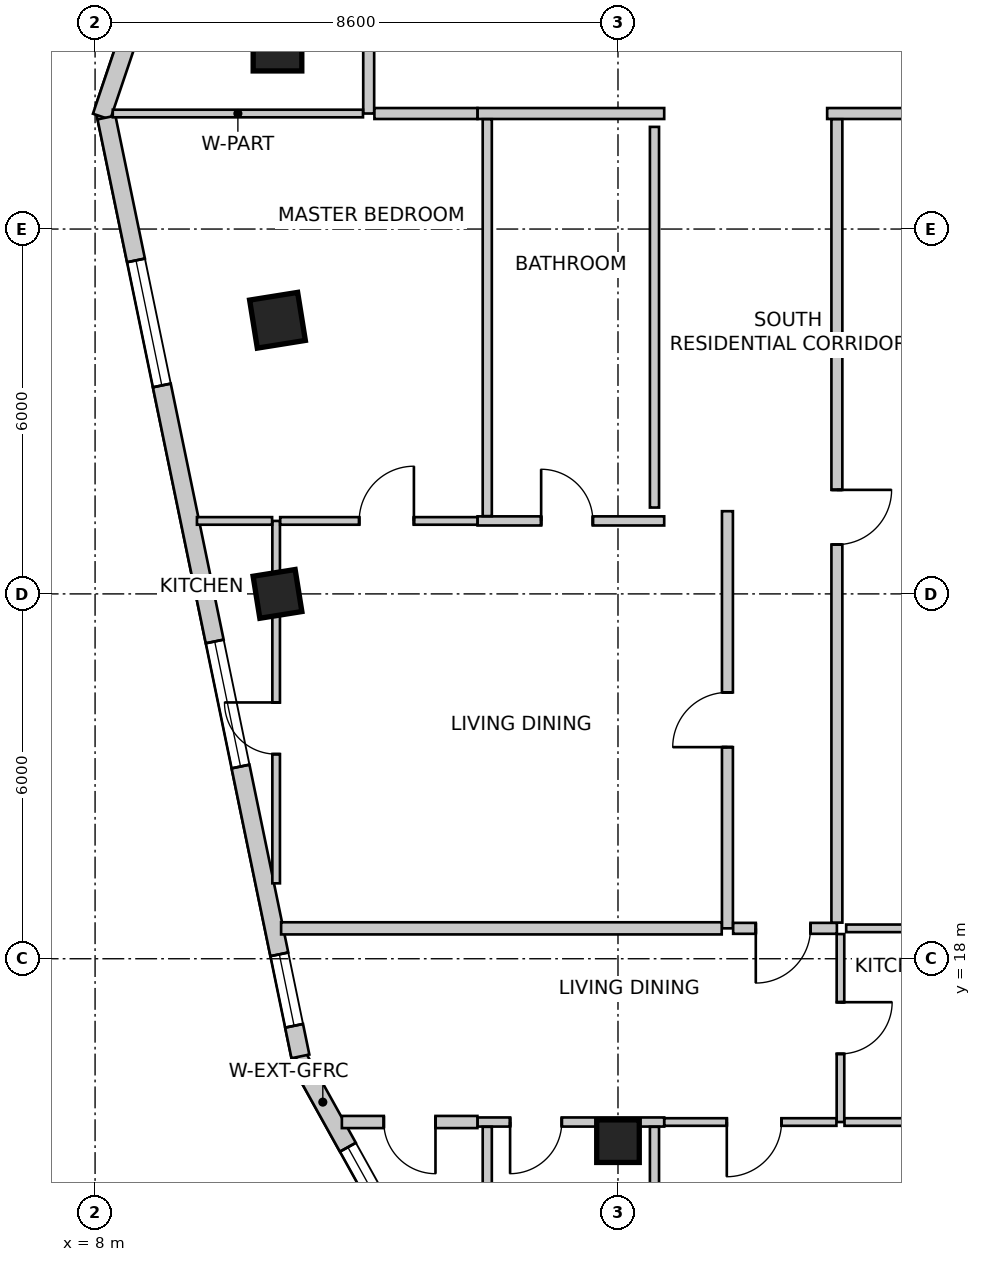
"""IFC4 building model, lengths in metres.
Left out: names, types, materials, properties, quantities, classifications, styles, units other than length and angle.
Written with IfcOpenShell. Run it as: python <this file> out.ifc"""

import sys

from ifc_helpers import new_model, si_unit, direction, frame, frame_2d, origin, origin_2d, place, context, subcontext, project, spatial, rectangle, extrude, source, transform, mapped, element, fill, save


model = new_model("IFC4")
c1 = context("Model", 3, precision=1e-05, world=origin(), true_north=direction((0.0, 1.0)))
c2 = subcontext(c1, "Body", "Model", "MODEL_VIEW")
j1 = project(units=[si_unit("LENGTHUNIT", "METRE"), si_unit("PLANEANGLEUNIT", "RADIAN")], contexts=[c1])
p1 = place(None, origin())
s1 = spatial("IfcSite", under=j1, at=p1, CompositionType="ELEMENT")
p2 = place(p1, origin())
s2 = spatial("IfcBuilding", under=s1, at=p2, CompositionType="ELEMENT")
p3 = place(p2, frame((0.0, 0.0, 200.9)))
s3 = spatial("IfcBuildingStorey", under=s2, at=p3, CompositionType="ELEMENT", Elevation=200.9)
m1 = source(origin(), c2, "Body", "SweptSolid", [
    extrude(rectangle(XDim=0.8, YDim=0.8, at=origin_2d()), origin(), (0.0, 0.0, 1.0), 3.5),
])
for number, where, z_axis, x_axis in (
    (1, (11.0, 33.0, 0.0), (0.0, 0.0, 1.0), (1.0, 0.0, 0.0)),
    (2, (11.0, 28.5, 0.0), (0.0, 0.0, 1.0), (0.158, -0.987, 0.0)),
):
    element("IfcColumn", number, at=place(p3, frame(where, z_axis=z_axis, x_axis=x_axis)), inside=s3, PredefinedType="COLUMN", context=c2, shape_type="MappedRepresentation", body=[
        mapped(m1, transform((0.0, 0.0, 0.0), scale=1.0)),
    ])
m2 = source(origin(), c2, "Body", "SweptSolid", [
    extrude(rectangle(XDim=0.7, YDim=0.7, at=origin_2d()), origin(), (0.0, 0.0, 1.0), 3.5),
])
for number, where, z_axis, x_axis in (
    (3, (11.0, 24.0, 0.0), (0.0, 0.0, 1.0), (0.158, -0.987, 0.0)),
    (4, (16.6, 15.0, 0.0), (0.0, 0.0, 1.0), (1.0, 0.0, 0.0)),
):
    element("IfcColumn", number, at=place(p3, frame(where, z_axis=z_axis, x_axis=x_axis)), inside=s3, PredefinedType="COLUMN", context=c2, shape_type="MappedRepresentation", body=[
        mapped(m2, transform((0.0, 0.0, 0.0), scale=1.0)),
    ])
p4 = place(p3, frame((11.333, 16.384, 0.0), z_axis=(0.0, 0.0, 1.0), x_axis=(0.485633305139, -0.874162623852, 0.0)))
e5 = element("IfcWall", 5, at=p4, inside=s3, PredefinedType="SOLIDWALL", context=c2, shape_type="SweptSolid", body=[
    extrude(rectangle(XDim=4.307, YDim=0.3, at=frame_2d((2.153, 0.0))), origin(), (0.0, 0.0, 1.0), 3.25),
])
m3 = source(origin(), c2, "Body", "SweptSolid", [
    extrude(rectangle(XDim=2.1, YDim=2.0, at=frame_2d((1.05, 1.0))), frame((0.0, 0.16, 0.0), z_axis=(0.0, -1.0, 0.0), x_axis=(1.0, 0.0, 0.0)), (0.0, 0.0, 1.0), 0.32),
])
p5 = place(p4, frame((1.697, 0.0, 0.85)))
e6 = element("IfcOpeningElement", 6, at=p5, cuts=e5, PredefinedType="OPENING", context=c2, shape_type="MappedRepresentation", body=[
    mapped(m3, transform((0.0, 0.0, 0.0), scale=1.0)),
])
p6 = place(p3, frame((13.269, 47.134, 0.0), z_axis=(0.0, 0.0, 1.0), x_axis=(-0.319920776449, -0.947444297464, 0.0)))
e7 = element("IfcWall", 7, at=p6, inside=s3, PredefinedType="SOLIDWALL", context=c2, shape_type="SweptSolid", body=[
    extrude(rectangle(XDim=16.133, YDim=0.3, at=frame_2d((8.067, 0.0))), origin(), (0.0, 0.0, 1.0), 3.25),
])
m4 = source(origin(), c2, "Body", "SweptSolid", [
    extrude(rectangle(XDim=2.4, YDim=2.2, at=frame_2d((1.2, 1.1))), frame((0.0, 0.16, 0.0), z_axis=(0.0, -1.0, 0.0), x_axis=(1.0, 0.0, 0.0)), (0.0, 0.0, 1.0), 0.32),
])
p7 = place(p6, frame((2.363, 0.0, 0.85)))
e8 = element("IfcOpeningElement", 8, at=p7, cuts=e7, PredefinedType="OPENING", context=c2, shape_type="MappedRepresentation", body=[
    mapped(m4, transform((0.0, 0.0, 0.0), scale=1.0)),
])
p8 = place(p6, frame((7.41, 0.0, 0.85)))
e9 = element("IfcOpeningElement", 9, at=p8, cuts=e7, PredefinedType="OPENING", context=c2, shape_type="MappedRepresentation", body=[
    mapped(m3, transform((0.0, 0.0, 0.0), scale=1.0)),
])
p9 = place(p6, frame((12.157, 0.0, 0.85)))
e10 = element("IfcOpeningElement", 10, at=p9, cuts=e7, PredefinedType="OPENING", context=c2, shape_type="MappedRepresentation", body=[
    mapped(m4, transform((0.0, 0.0, 0.0), scale=1.0)),
])
p10 = place(p3, frame((8.188, 31.834, 0.0), z_axis=(0.0, 0.0, 1.0), x_axis=(0.202303475707, -0.979322880217, 0.0)))
e11 = element("IfcWall", 11, at=p10, inside=s3, PredefinedType="SOLIDWALL", context=c2, shape_type="SweptSolid", body=[
    extrude(rectangle(XDim=15.766, YDim=0.3, at=frame_2d((7.883, 0.0))), origin(), (0.0, 0.0, 1.0), 3.25),
])
p11 = place(p10, frame((2.399, 0.0, 0.85)))
e12 = element("IfcOpeningElement", 12, at=p11, cuts=e11, PredefinedType="OPENING", context=c2, shape_type="MappedRepresentation", body=[
    mapped(m3, transform((0.0, 0.0, 0.0), scale=1.0)),
])
p12 = place(p10, frame((8.798, 0.0, 0.85)))
e13 = element("IfcOpeningElement", 13, at=p12, cuts=e11, PredefinedType="OPENING", context=c2, shape_type="MappedRepresentation", body=[
    mapped(m3, transform((0.0, 0.0, 0.0), scale=1.0)),
])
m5 = source(origin(), c2, "Body", "SweptSolid", [
    extrude(rectangle(XDim=1.2, YDim=1.6, at=frame_2d((0.6, 0.8))), frame((0.0, 0.16, 0.0), z_axis=(0.0, -1.0, 0.0), x_axis=(1.0, 0.0, 0.0)), (0.0, 0.0, 1.0), 0.32),
])
p13 = place(p10, frame((14.052, 0.0, 0.85)))
e14 = element("IfcOpeningElement", 14, at=p13, cuts=e11, PredefinedType="OPENING", context=c2, shape_type="MappedRepresentation", body=[
    mapped(m5, transform((0.0, 0.0, 0.0), scale=1.0)),
])
p14 = place(p3, frame((12.5, 31.9, 0.0), z_axis=(0.0, 0.0, 1.0), x_axis=(0.0, 1.0, 0.0)))
e15 = element("IfcWall", 15, at=p14, inside=s3, PredefinedType="PARTITIONING", context=c2, shape_type="SweptSolid", body=[
    extrude(rectangle(XDim=1.556, YDim=0.18, at=frame_2d((0.778, 0.0))), origin(), (0.0, 0.0, 1.0), 2.934),
])
p15 = place(p3, frame((17.36, 31.9, 0.0), z_axis=(0.0, 0.0, 1.0), x_axis=(-1.0, 0.0, 0.0)))
e16 = element("IfcWall", 16, at=p15, inside=s3, PredefinedType="PARTITIONING", context=c2, shape_type="SweptSolid", body=[
    extrude(rectangle(XDim=3.07, YDim=0.18, at=frame_2d((1.535, 0.0))), origin(), (0.0, 0.0, 1.0), 2.934),
])
p16 = place(p3, frame((14.288, 31.9, 0.0), z_axis=(0.0, 0.0, 1.0), x_axis=(-1.0, 0.0, 0.0)))
e17 = element("IfcWall", 17, at=p16, inside=s3, PredefinedType="PARTITIONING", context=c2, shape_type="SweptSolid", body=[
    extrude(rectangle(XDim=1.694, YDim=0.18, at=frame_2d((0.847, 0.0))), origin(), (0.0, 0.0, 1.0), 2.934),
])
p17 = place(p3, frame((29.265, 31.9, 0.0), z_axis=(0.0, 0.0, 1.0), x_axis=(-1.0, 0.0, 0.0)))
e18 = element("IfcWall", 18, at=p17, inside=s3, PredefinedType="PARTITIONING", context=c2, shape_type="SweptSolid", body=[
    extrude(rectangle(XDim=9.225, YDim=0.18, at=frame_2d((4.613, 0.0))), origin(), (0.0, 0.0, 1.0), 2.934),
])
p18 = place(p3, frame((12.406, 31.9, 0.0), z_axis=(0.0, 0.0, 1.0), x_axis=(-1.0, 0.0, 0.0)))
e19 = element("IfcWall", 19, at=p18, inside=s3, PredefinedType="PARTITIONING", context=c2, shape_type="SweptSolid", body=[
    extrude(rectangle(XDim=4.115, YDim=0.125, at=frame_2d((2.057, 0.0))), origin(), (0.0, 0.0, 1.0), 2.542),
])
p19 = place(p3, frame((18.4, 18.5, 0.0), z_axis=(0.0, 0.0, 1.0), x_axis=(0.0, 1.0, 0.0)))
e20 = element("IfcWall", 20, at=p19, inside=s3, PredefinedType="PARTITIONING", context=c2, shape_type="SweptSolid", body=[
    extrude(rectangle(XDim=6.86, YDim=0.18, at=frame_2d((3.43, 0.0))), origin(), (0.0, 0.0, 1.0), 2.766),
])
m6 = source(origin(), c2, "Body", "SweptSolid", [
    extrude(rectangle(XDim=0.9, YDim=2.15, at=frame_2d((0.45, 1.075))), frame((0.0, 0.1, 0.0), z_axis=(0.0, -1.0, 0.0), x_axis=(1.0, 0.0, 0.0)), (0.0, 0.0, 1.0), 0.2),
])
p20 = place(p19, frame((2.98, 0.0, 0.0)))
e21 = element("IfcOpeningElement", 21, at=p20, cuts=e20, PredefinedType="OPENING", context=c2, shape_type="MappedRepresentation", body=[
    mapped(m6, transform((0.0, 0.0, 0.0), scale=1.0)),
])
p21 = place(p3, frame((20.2, 18.5, 0.0), z_axis=(0.0, 0.0, 1.0), x_axis=(-1.0, 0.0, 0.0)))
e22 = element("IfcWall", 22, at=p21, inside=s3, PredefinedType="PARTITIONING", context=c2, shape_type="SweptSolid", body=[
    extrude(rectangle(XDim=1.706, YDim=0.18, at=frame_2d((0.853, 0.0))), origin(), (0.0, 0.0, 1.0), 3.25),
])
p22 = place(p21, frame((0.434, 0.0, 0.0)))
e23 = element("IfcOpeningElement", 23, at=p22, cuts=e22, PredefinedType="OPENING", context=c2, shape_type="MappedRepresentation", body=[
    mapped(m6, transform((0.0, 0.0, 0.0), scale=1.0)),
])
p23 = place(p3, frame((20.2, 31.806, 0.0), z_axis=(0.0, 0.0, 1.0), x_axis=(0.0, -1.0, 0.0)))
e24 = element("IfcWall", 24, at=p23, inside=s3, PredefinedType="PARTITIONING", context=c2, shape_type="SweptSolid", body=[
    extrude(rectangle(XDim=13.212, YDim=0.18, at=frame_2d((6.606, 0.0))), origin(), (0.0, 0.0, 1.0), 2.766),
])
p24 = place(p23, frame((6.095, 0.0, 0.0)))
e25 = element("IfcOpeningElement", 25, at=p24, cuts=e24, PredefinedType="OPENING", context=c2, shape_type="MappedRepresentation", body=[
    mapped(m6, transform((0.0, 0.0, 0.0), scale=1.0)),
])
p25 = place(p3, frame((10.978, 19.24, 0.0), z_axis=(0.0, 0.0, 1.0), x_axis=(0.0, 1.0, 0.0)))
e26 = element("IfcWall", 26, at=p25, inside=s3, PredefinedType="PARTITIONING", context=c2, shape_type="SweptSolid", body=[
    extrude(rectangle(XDim=5.96, YDim=0.125, at=frame_2d((2.98, 0.0))), origin(), (0.0, 0.0, 1.0), 2.542),
])
m7 = source(origin(), c2, "Body", "SweptSolid", [
    extrude(rectangle(XDim=0.85, YDim=2.15, at=frame_2d((0.425, 1.075))), frame((0.0, 0.073, 0.0), z_axis=(0.0, -1.0, 0.0), x_axis=(1.0, 0.0, 0.0)), (0.0, 0.0, 1.0), 0.145),
])
p26 = place(p25, frame((2.125, 0.0, 0.0)))
e27 = element("IfcOpeningElement", 27, at=p26, cuts=e26, PredefinedType="OPENING", context=c2, shape_type="MappedRepresentation", body=[
    mapped(m7, transform((0.0, 0.0, 0.0), scale=1.0)),
])
p27 = place(p3, frame((14.29, 25.2, 0.0), z_axis=(0.0, 0.0, 1.0), x_axis=(1.0, 0.0, 0.0)))
e28 = element("IfcWall", 28, at=p27, inside=s3, PredefinedType="PARTITIONING", context=c2, shape_type="SweptSolid", body=[
    extrude(rectangle(XDim=3.07, YDim=0.15, at=frame_2d((1.535, 0.0))), origin(), (0.0, 0.0, 1.0), 2.822),
])
m8 = source(origin(), c2, "Body", "SweptSolid", [
    extrude(rectangle(XDim=0.85, YDim=2.15, at=frame_2d((0.425, 1.075))), frame((0.0, 0.085, 0.0), z_axis=(0.0, -1.0, 0.0), x_axis=(1.0, 0.0, 0.0)), (0.0, 0.0, 1.0), 0.17),
])
p28 = place(p27, frame((1.046, 0.0, 0.0)))
e29 = element("IfcOpeningElement", 29, at=p28, cuts=e28, PredefinedType="OPENING", context=c2, shape_type="MappedRepresentation", body=[
    mapped(m8, transform((0.0, 0.0, 0.0), scale=1.0)),
])
p29 = place(p3, frame((11.044, 25.2, 0.0), z_axis=(0.0, 0.0, 1.0), x_axis=(1.0, 0.0, 0.0)))
e30 = element("IfcWall", 30, at=p29, inside=s3, PredefinedType="PARTITIONING", context=c2, shape_type="SweptSolid", body=[
    extrude(rectangle(XDim=3.244, YDim=0.125, at=frame_2d((1.622, 0.0))), origin(), (0.0, 0.0, 1.0), 2.542),
])
m9 = source(origin(), c2, "Body", "SweptSolid", [
    extrude(rectangle(XDim=0.9, YDim=2.15, at=frame_2d((0.45, 1.075))), frame((0.0, 0.073, 0.0), z_axis=(0.0, -1.0, 0.0), x_axis=(1.0, 0.0, 0.0)), (0.0, 0.0, 1.0), 0.145),
])
p30 = place(p29, frame((1.299, 0.0, 0.0)))
e31 = element("IfcOpeningElement", 31, at=p30, cuts=e30, PredefinedType="OPENING", context=c2, shape_type="MappedRepresentation", body=[
    mapped(m9, transform((0.0, 0.0, 0.0), scale=1.0)),
])
p31 = place(p3, frame((18.306, 18.5, 0.0), z_axis=(0.0, 0.0, 1.0), x_axis=(-1.0, 0.0, 0.0)))
e32 = element("IfcWall", 32, at=p31, inside=s3, PredefinedType="PARTITIONING", context=c2, shape_type="SweptSolid", body=[
    extrude(rectangle(XDim=7.246, YDim=0.2, at=frame_2d((3.623, 0.0))), origin(), (0.0, 0.0, 1.0), 3.25),
])
p32 = place(p3, frame((9.675, 25.2, 0.0), z_axis=(0.0, 0.0, 1.0), x_axis=(1.0, 0.0, 0.0)))
e33 = element("IfcWall", 33, at=p32, inside=s3, PredefinedType="PARTITIONING", context=c2, shape_type="SweptSolid", body=[
    extrude(rectangle(XDim=1.236, YDim=0.125, at=frame_2d((0.618, 0.0))), origin(), (0.0, 0.0, 1.0), 2.542),
])
p33 = place(p3, frame((14.45, 25.279, 0.0), z_axis=(0.0, 0.0, 1.0), x_axis=(0.0, 1.0, 0.0)))
e34 = element("IfcWall", 34, at=p33, inside=s3, PredefinedType="PARTITIONING", context=c2, shape_type="SweptSolid", body=[
    extrude(rectangle(XDim=6.527, YDim=0.15, at=frame_2d((3.263, 0.0))), origin(), (0.0, 0.0, 1.0), 2.766),
])
p34 = place(p3, frame((20.259, 18.406, 0.0), z_axis=(0.0, 0.0, 1.0), x_axis=(0.0, -1.0, 0.0)))
e35 = element("IfcWall", 35, at=p34, inside=s3, PredefinedType="PARTITIONING", context=c2, shape_type="SweptSolid", body=[
    extrude(rectangle(XDim=3.091, YDim=0.125, at=frame_2d((1.545, 0.0))), origin(), (0.0, 0.0, 1.0), 2.822),
])
p35 = place(p34, frame((1.121, 0.0, 0.0)))
e36 = element("IfcOpeningElement", 36, at=p35, cuts=e35, PredefinedType="OPENING", context=c2, shape_type="MappedRepresentation", body=[
    mapped(m7, transform((0.0, 0.0, 0.0), scale=1.0)),
])
p36 = place(p3, frame((17.36, 15.315, 0.0), z_axis=(0.0, 0.0, 1.0), x_axis=(-1.0, 0.0, 0.0)))
e37 = element("IfcWall", 37, at=p36, inside=s3, PredefinedType="PARTITIONING", context=c2, shape_type="SweptSolid", body=[
    extrude(rectangle(XDim=3.07, YDim=0.15, at=frame_2d((1.535, 0.0))), origin(), (0.0, 0.0, 1.0), 2.822),
])
p37 = place(p36, frame((1.685, 0.0, 0.0)))
e38 = element("IfcOpeningElement", 38, at=p37, cuts=e37, PredefinedType="OPENING", context=c2, shape_type="MappedRepresentation", body=[
    mapped(m8, transform((0.0, 0.0, 0.0), scale=1.0)),
])
p38 = place(p3, frame((14.288, 15.315, 0.0), z_axis=(0.0, 0.0, 1.0), x_axis=(-1.0, 0.0, 0.0)))
e39 = element("IfcWall", 39, at=p38, inside=s3, PredefinedType="PARTITIONING", context=c2, shape_type="SweptSolid", body=[
    extrude(rectangle(XDim=2.229, YDim=0.2, at=frame_2d((1.115, 0.0))), origin(), (0.0, 0.0, 1.0), 3.25),
])
m10 = source(origin(), c2, "Body", "SweptSolid", [
    extrude(rectangle(XDim=0.85, YDim=2.15, at=frame_2d((0.425, 1.075))), frame((0.0, 0.11, 0.0), z_axis=(0.0, -1.0, 0.0), x_axis=(1.0, 0.0, 0.0)), (0.0, 0.0, 1.0), 0.22),
])
p39 = place(p38, frame((0.69, 0.0, 0.0)))
e40 = element("IfcOpeningElement", 40, at=p39, cuts=e39, PredefinedType="OPENING", context=c2, shape_type="MappedRepresentation", body=[
    mapped(m10, transform((0.0, 0.0, 0.0), scale=1.0)),
])
p40 = place(p3, frame((20.192, 15.315, 0.0), z_axis=(0.0, 0.0, 1.0), x_axis=(-1.0, 0.0, 0.0)))
e41 = element("IfcWall", 41, at=p40, inside=s3, PredefinedType="PARTITIONING", context=c2, shape_type="SweptSolid", body=[
    extrude(rectangle(XDim=2.83, YDim=0.125, at=frame_2d((1.415, 0.0))), origin(), (0.0, 0.0, 1.0), 3.25),
])
p41 = place(p40, frame((0.903, 0.0, 0.0)))
e42 = element("IfcOpeningElement", 42, at=p41, cuts=e41, PredefinedType="OPENING", context=c2, shape_type="MappedRepresentation", body=[
    mapped(m9, transform((0.0, 0.0, 0.0), scale=1.0)),
])
p42 = place(p3, frame((23.792, 15.315, 0.0), z_axis=(0.0, 0.0, 1.0), x_axis=(-1.0, 0.0, 0.0)))
e43 = element("IfcWall", 43, at=p42, inside=s3, PredefinedType="PARTITIONING", context=c2, shape_type="SweptSolid", body=[
    extrude(rectangle(XDim=3.467, YDim=0.125, at=frame_2d((1.733, 0.0))), origin(), (0.0, 0.0, 1.0), 2.542),
])
p43 = place(p3, frame((20.353, 18.5, 0.0), z_axis=(0.0, 0.0, 1.0), x_axis=(1.0, 0.0, 0.0)))
e44 = element("IfcWall", 44, at=p43, inside=s3, PredefinedType="PARTITIONING", context=c2, shape_type="SweptSolid", body=[
    extrude(rectangle(XDim=3.439, YDim=0.125, at=frame_2d((1.72, 0.0))), origin(), (0.0, 0.0, 1.0), 2.542),
])
p44 = place(p3, frame((14.45, 12.865, 0.0), z_axis=(0.0, 0.0, 1.0), x_axis=(0.0, 1.0, 0.0)))
e45 = element("IfcWall", 45, at=p44, inside=s3, PredefinedType="PARTITIONING", context=c2, shape_type="SweptSolid", body=[
    extrude(rectangle(XDim=2.371, YDim=0.15, at=frame_2d((1.186, 0.0))), origin(), (0.0, 0.0, 1.0), 3.25),
])
p45 = place(p3, frame((17.2, 15.236, 0.0), z_axis=(0.0, 0.0, 1.0), x_axis=(0.0, -1.0, 0.0)))
e46 = element("IfcWall", 46, at=p45, inside=s3, PredefinedType="PARTITIONING", context=c2, shape_type="SweptSolid", body=[
    extrude(rectangle(XDim=2.371, YDim=0.15, at=frame_2d((1.186, 0.0))), origin(), (0.0, 0.0, 1.0), 2.542),
])
p46 = place(p3, frame((17.2, 31.68, 0.0), z_axis=(0.0, 0.0, 1.0), x_axis=(0.0, -1.0, 0.0)))
e47 = element("IfcWall", 47, at=p46, inside=s3, PredefinedType="PARTITIONING", context=c2, shape_type="SweptSolid", body=[
    extrude(rectangle(XDim=6.26, YDim=0.15, at=frame_2d((3.13, 0.0))), origin(), (0.0, 0.0, 1.0), 2.766),
])
m11 = source(origin(), c2, "Body", "SweptSolid", [
    extrude(rectangle(XDim=2.1, YDim=2.0, at=frame_2d((1.05, 1.0))), frame((0.0, -0.015, 0.0), z_axis=(0.0, -1.0, 0.0), x_axis=(1.0, 0.0, 0.0)), (0.0, 0.0, 1.0), 0.06),
])
p47 = place(p5, origin())
e48 = element("IfcWindow", 48, at=p47, inside=s3, PartitioningType="SINGLE_PANEL", PredefinedType="WINDOW", context=c2, shape_type="MappedRepresentation", body=[
    mapped(m11, transform((0.0, 0.0, 0.0), scale=1.0)),
])
fill(e6, e48)
p48 = place(p11, origin())
e49 = element("IfcWindow", 49, at=p48, inside=s3, PartitioningType="SINGLE_PANEL", PredefinedType="WINDOW", context=c2, shape_type="MappedRepresentation", body=[
    mapped(m11, transform((0.0, 0.0, 0.0), scale=1.0)),
])
fill(e12, e49)
p49 = place(p12, origin())
e50 = element("IfcWindow", 50, at=p49, inside=s3, PartitioningType="SINGLE_PANEL", PredefinedType="WINDOW", context=c2, shape_type="MappedRepresentation", body=[
    mapped(m11, transform((0.0, 0.0, 0.0), scale=1.0)),
])
fill(e13, e50)
m12 = source(origin(), c2, "Body", "SweptSolid", [
    extrude(rectangle(XDim=1.2, YDim=1.6, at=frame_2d((0.6, 0.8))), frame((0.0, -0.015, 0.0), z_axis=(0.0, -1.0, 0.0), x_axis=(1.0, 0.0, 0.0)), (0.0, 0.0, 1.0), 0.06),
])
p50 = place(p13, origin())
e51 = element("IfcWindow", 51, at=p50, inside=s3, PartitioningType="SINGLE_PANEL", PredefinedType="WINDOW", context=c2, shape_type="MappedRepresentation", body=[
    mapped(m12, transform((0.0, 0.0, 0.0), scale=1.0)),
])
fill(e14, e51)
m13 = source(origin(), c2, "Body", "SweptSolid", [
    extrude(rectangle(XDim=0.9, YDim=2.15, at=frame_2d((0.45, 1.075))), frame((0.0, 0.025, 0.0), z_axis=(0.0, -1.0, 0.0), x_axis=(1.0, 0.0, 0.0)), (0.0, 0.0, 1.0), 0.05),
])
p51 = place(p20, origin())
e52 = element("IfcDoor", 52, at=p51, inside=s3, OperationType="SINGLE_SWING_LEFT", PredefinedType="DOOR", context=c2, shape_type="MappedRepresentation", body=[
    mapped(m13, transform((0.0, 0.0, 0.0), scale=1.0)),
])
fill(e21, e52)
m14 = source(origin(), c2, "Body", "SweptSolid", [
    extrude(rectangle(XDim=0.85, YDim=2.15, at=frame_2d((0.425, 1.075))), frame((0.0, 0.025, 0.0), z_axis=(0.0, -1.0, 0.0), x_axis=(1.0, 0.0, 0.0)), (0.0, 0.0, 1.0), 0.05),
])
p52 = place(p26, origin())
e53 = element("IfcDoor", 53, at=p52, inside=s3, OperationType="SINGLE_SWING_RIGHT", PredefinedType="DOOR", context=c2, shape_type="MappedRepresentation", body=[
    mapped(m14, transform((0.0, 0.0, 0.0), scale=1.0)),
])
fill(e27, e53)
p53 = place(p28, origin())
e54 = element("IfcDoor", 54, at=p53, inside=s3, OperationType="SINGLE_SWING_LEFT", PredefinedType="DOOR", context=c2, shape_type="MappedRepresentation", body=[
    mapped(m14, transform((0.0, 0.0, 0.0), scale=1.0)),
])
fill(e29, e54)
m15 = source(origin(), c2, "Body", "SweptSolid", [
    extrude(rectangle(XDim=0.9, YDim=2.15, at=frame_2d((0.45, 1.075))), frame((0.0, 0.025, 0.0), z_axis=(0.0, -1.0, 0.0), x_axis=(1.0, 0.0, 0.0)), (0.0, 0.0, 1.0), 0.05),
])
p54 = place(p30, origin())
e55 = element("IfcDoor", 55, at=p54, inside=s3, OperationType="SINGLE_SWING_RIGHT", PredefinedType="DOOR", context=c2, shape_type="MappedRepresentation", body=[
    mapped(m15, transform((0.0, 0.0, 0.0), scale=1.0)),
])
fill(e31, e55)
p55 = place(p22, origin())
e56 = element("IfcDoor", 56, at=p55, inside=s3, OperationType="SINGLE_SWING_RIGHT", PredefinedType="DOOR", context=c2, shape_type="MappedRepresentation", body=[
    mapped(m13, transform((0.0, 0.0, 0.0), scale=1.0)),
])
fill(e23, e56)
p56 = place(p35, origin())
e57 = element("IfcDoor", 57, at=p56, inside=s3, OperationType="SINGLE_SWING_LEFT", PredefinedType="DOOR", context=c2, shape_type="MappedRepresentation", body=[
    mapped(m14, transform((0.0, 0.0, 0.0), scale=1.0)),
])
fill(e36, e57)
p57 = place(p37, origin())
e58 = element("IfcDoor", 58, at=p57, inside=s3, OperationType="SINGLE_SWING_RIGHT", PredefinedType="DOOR", context=c2, shape_type="MappedRepresentation", body=[
    mapped(m14, transform((0.0, 0.0, 0.0), scale=1.0)),
])
fill(e38, e58)
p58 = place(p39, origin())
e59 = element("IfcDoor", 59, at=p58, inside=s3, OperationType="SINGLE_SWING_LEFT", PredefinedType="DOOR", context=c2, shape_type="MappedRepresentation", body=[
    mapped(m14, transform((0.0, 0.0, 0.0), scale=1.0)),
])
fill(e40, e59)
p59 = place(p41, origin())
e60 = element("IfcDoor", 60, at=p59, inside=s3, OperationType="SINGLE_SWING_RIGHT", PredefinedType="DOOR", context=c2, shape_type="MappedRepresentation", body=[
    mapped(m15, transform((0.0, 0.0, 0.0), scale=1.0)),
])
fill(e42, e60)
p60 = place(p24, origin())
e61 = element("IfcDoor", 61, at=p60, inside=s3, OperationType="SINGLE_SWING_LEFT", PredefinedType="DOOR", context=c2, shape_type="MappedRepresentation", body=[
    mapped(m15, transform((0.0, 0.0, 0.0), scale=1.0)),
])
fill(e25, e61)
save(model, sys.argv[1])
